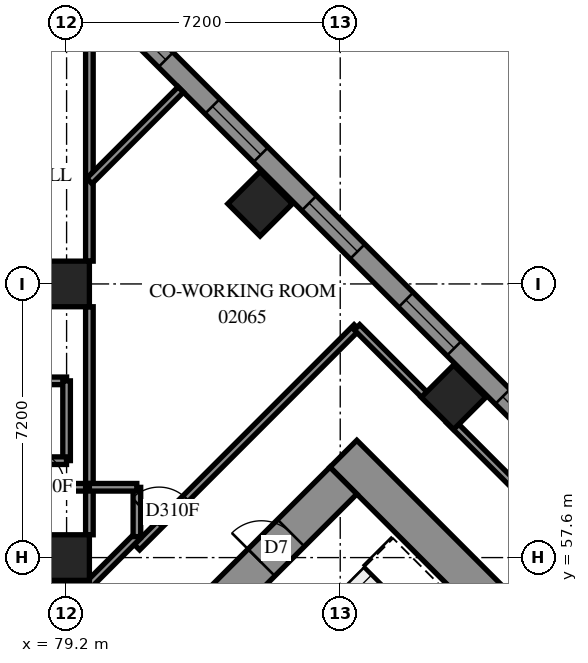
"""IFC4 building model, lengths in metres.
Left out: names, types, materials, properties, quantities, classifications, styles, units other than length and angle.
Written with IfcOpenShell. Run it as: python <this file> out.ifc"""

import sys

from ifc_helpers import new_model, si_unit, direction, frame, frame_2d, origin, origin_2d, place, context, subcontext, project, spatial, polyline, rectangle, outline, extrude, element, fill, save


model = new_model("IFC4")
c1 = context("Model", 3, precision=1e-05, world=origin(), true_north=direction((0.0, 1.0)))
c2 = subcontext(c1, "Body", "Model", "MODEL_VIEW")
j1 = project(units=[si_unit("LENGTHUNIT", "METRE"), si_unit("PLANEANGLEUNIT", "RADIAN")], contexts=[c1])
p1 = place(None, origin())
s1 = spatial("IfcSite", under=j1, at=p1, CompositionType="ELEMENT")
p2 = place(p1, origin())
s2 = spatial("IfcBuilding", under=s1, at=p2, CompositionType="ELEMENT")
p3 = place(p2, frame((0.0, 0.0, 10.2)))
s3 = spatial("IfcBuildingStorey", under=s2, at=p3, CompositionType="ELEMENT", Elevation=10.2)
for number, where, z_axis, x_axis in (
    (1, (79.2, 57.6, 0.0), (0.0, 0.0, 1.0), (1.0, 0.0, 0.0)),
    (2, (79.2, 64.8, 0.0), (0.0, 0.0, 1.0), (1.0, 0.0, 0.0)),
    (3, (84.291, 66.909, 0.0), (0.0, 0.0, 1.0), (0.707, -0.707, 0.0)),
    (4, (89.382, 61.818, 0.0), (0.0, 0.0, 1.0), (0.707, -0.707, 0.0)),
):
    element("IfcColumn", number, at=place(p3, frame(where, z_axis=z_axis, x_axis=x_axis)), inside=s3, PredefinedType="COLUMN", context=c2, shape_type="SweptSolid", body=[
        extrude(rectangle(XDim=1.2, YDim=1.2, at=origin_2d()), origin(), (0.0, 0.0, 1.0), 3.8),
    ])
p4 = place(p3, frame((86.483, 60.333, -0.4), z_axis=(0.0, 0.0, 1.0), x_axis=(0.70710983, -0.7071037324, 0.0)))
e5 = element("IfcWall", 5, at=p4, inside=s3, PredefinedType="SHEAR", context=c2, shape_type="SweptSolid", body=[
    extrude(rectangle(XDim=16.4, YDim=1.0, at=frame_2d((8.2, 0.0))), origin(), (0.0, 0.0, 1.0), 3.5),
])
p5 = place(p4, frame((11.0, 0.0, 0.4)))
e6 = element("IfcOpeningElement", 6, at=p5, cuts=e5, PredefinedType="OPENING", context=c2, shape_type="SweptSolid", body=[
    extrude(rectangle(XDim=0.8, YDim=2.1, at=frame_2d((0.4, 1.05))), frame((0.0, 0.51, 0.0), z_axis=(0.0, -1.0, 0.0), x_axis=(1.0, 0.0, 0.0)), (0.0, 0.0, 1.0), 1.02),
])
p6 = place(p3, frame((76.301, 49.443, -0.4), z_axis=(0.0, 0.0, 1.0), x_axis=(0.7071067812, 0.7071067812, 0.0)))
e7 = element("IfcWall", 7, at=p6, inside=s3, PredefinedType="SHEAR", context=c2, shape_type="SweptSolid", body=[
    extrude(rectangle(XDim=14.4, YDim=1.0, at=frame_2d((7.2, 0.0))), origin(), (0.0, 0.0, 1.0), 3.5),
])
p7 = place(p6, frame((4.55, 0.0, 0.4)))
e8 = element("IfcOpeningElement", 8, at=p7, cuts=e7, PredefinedType="OPENING", context=c2, shape_type="SweptSolid", body=[
    extrude(rectangle(XDim=1.1, YDim=2.1, at=frame_2d((0.55, 1.05))), frame((0.0, 0.51, 0.0), z_axis=(0.0, -1.0, 0.0), x_axis=(1.0, 0.0, 0.0)), (0.0, 0.0, 1.0), 1.02),
])
p8 = place(p6, frame((11.35, 0.0, 0.4)))
e9 = element("IfcOpeningElement", 9, at=p8, cuts=e7, PredefinedType="OPENING", context=c2, shape_type="SweptSolid", body=[
    extrude(rectangle(XDim=1.1, YDim=2.1, at=frame_2d((0.55, 1.05))), frame((0.0, 0.51, 0.0), z_axis=(0.0, -1.0, 0.0), x_axis=(1.0, 0.0, 0.0)), (0.0, 0.0, 1.0), 1.02),
])
p9 = place(p3, frame((117.843, 34.665, 0.0), z_axis=(0.0, 0.0, 1.0), x_axis=(-0.7071067812, 0.7071067812, 0.0)))
e10 = element("IfcWall", 10, at=p9, inside=s3, PredefinedType="SOLIDWALL", context=c2, shape_type="SweptSolid", body=[
    extrude(outline(polyline([(-0.275, -0.275), (54.222, -0.275), (53.994, 0.275), (0.275, 0.275), (-0.275, -0.275)])), origin(), (0.0, 0.0, 1.0), 3.8),
])
p10 = place(p9, frame((0.8, 0.0, 0.7)))
e11 = element("IfcOpeningElement", 11, at=p10, cuts=e10, PredefinedType="OPENING", context=c2, shape_type="SweptSolid", body=[
    extrude(rectangle(XDim=1.8, YDim=2.6, at=frame_2d((0.9, 1.3))), frame((0.0, 0.285, 0.0), z_axis=(0.0, -1.0, 0.0), x_axis=(1.0, 0.0, 0.0)), (0.0, 0.0, 1.0), 0.57),
])
p11 = place(p9, frame((4.225, 0.0, 0.7)))
e12 = element("IfcOpeningElement", 12, at=p11, cuts=e10, PredefinedType="OPENING", context=c2, shape_type="SweptSolid", body=[
    extrude(rectangle(XDim=1.8, YDim=2.6, at=frame_2d((0.9, 1.3))), frame((0.0, 0.285, 0.0), z_axis=(0.0, -1.0, 0.0), x_axis=(1.0, 0.0, 0.0)), (0.0, 0.0, 1.0), 0.57),
])
p12 = place(p9, frame((7.825, 0.0, 0.7)))
e13 = element("IfcOpeningElement", 13, at=p12, cuts=e10, PredefinedType="OPENING", context=c2, shape_type="SweptSolid", body=[
    extrude(rectangle(XDim=1.8, YDim=2.6, at=frame_2d((0.9, 1.3))), frame((0.0, 0.285, 0.0), z_axis=(0.0, -1.0, 0.0), x_axis=(1.0, 0.0, 0.0)), (0.0, 0.0, 1.0), 0.57),
])
p13 = place(p9, frame((11.425, 0.0, 0.7)))
e14 = element("IfcOpeningElement", 14, at=p13, cuts=e10, PredefinedType="OPENING", context=c2, shape_type="SweptSolid", body=[
    extrude(rectangle(XDim=1.8, YDim=2.6, at=frame_2d((0.9, 1.3))), frame((0.0, 0.285, 0.0), z_axis=(0.0, -1.0, 0.0), x_axis=(1.0, 0.0, 0.0)), (0.0, 0.0, 1.0), 0.57),
])
p14 = place(p9, frame((15.025, 0.0, 0.7)))
e15 = element("IfcOpeningElement", 15, at=p14, cuts=e10, PredefinedType="OPENING", context=c2, shape_type="SweptSolid", body=[
    extrude(rectangle(XDim=1.8, YDim=2.6, at=frame_2d((0.9, 1.3))), frame((0.0, 0.285, 0.0), z_axis=(0.0, -1.0, 0.0), x_axis=(1.0, 0.0, 0.0)), (0.0, 0.0, 1.0), 0.57),
])
p15 = place(p9, frame((18.625, 0.0, 0.7)))
e16 = element("IfcOpeningElement", 16, at=p15, cuts=e10, PredefinedType="OPENING", context=c2, shape_type="SweptSolid", body=[
    extrude(rectangle(XDim=1.8, YDim=2.6, at=frame_2d((0.9, 1.3))), frame((0.0, 0.285, 0.0), z_axis=(0.0, -1.0, 0.0), x_axis=(1.0, 0.0, 0.0)), (0.0, 0.0, 1.0), 0.57),
])
p16 = place(p9, frame((22.225, 0.0, 0.7)))
e17 = element("IfcOpeningElement", 17, at=p16, cuts=e10, PredefinedType="OPENING", context=c2, shape_type="SweptSolid", body=[
    extrude(rectangle(XDim=1.8, YDim=2.6, at=frame_2d((0.9, 1.3))), frame((0.0, 0.285, 0.0), z_axis=(0.0, -1.0, 0.0), x_axis=(1.0, 0.0, 0.0)), (0.0, 0.0, 1.0), 0.57),
])
p17 = place(p9, frame((25.825, 0.0, 0.7)))
e18 = element("IfcOpeningElement", 18, at=p17, cuts=e10, PredefinedType="OPENING", context=c2, shape_type="SweptSolid", body=[
    extrude(rectangle(XDim=1.8, YDim=2.6, at=frame_2d((0.9, 1.3))), frame((0.0, 0.285, 0.0), z_axis=(0.0, -1.0, 0.0), x_axis=(1.0, 0.0, 0.0)), (0.0, 0.0, 1.0), 0.57),
])
p18 = place(p9, frame((29.425, 0.0, 0.7)))
e19 = element("IfcOpeningElement", 19, at=p18, cuts=e10, PredefinedType="OPENING", context=c2, shape_type="SweptSolid", body=[
    extrude(rectangle(XDim=1.8, YDim=2.6, at=frame_2d((0.9, 1.3))), frame((0.0, 0.285, 0.0), z_axis=(0.0, -1.0, 0.0), x_axis=(1.0, 0.0, 0.0)), (0.0, 0.0, 1.0), 0.57),
])
p19 = place(p9, frame((33.025, 0.0, 0.7)))
e20 = element("IfcOpeningElement", 20, at=p19, cuts=e10, PredefinedType="OPENING", context=c2, shape_type="SweptSolid", body=[
    extrude(rectangle(XDim=1.8, YDim=2.6, at=frame_2d((0.9, 1.3))), frame((0.0, 0.285, 0.0), z_axis=(0.0, -1.0, 0.0), x_axis=(1.0, 0.0, 0.0)), (0.0, 0.0, 1.0), 0.57),
])
p20 = place(p9, frame((36.625, 0.0, 0.7)))
e21 = element("IfcOpeningElement", 21, at=p20, cuts=e10, PredefinedType="OPENING", context=c2, shape_type="SweptSolid", body=[
    extrude(rectangle(XDim=1.8, YDim=2.6, at=frame_2d((0.9, 1.3))), frame((0.0, 0.285, 0.0), z_axis=(0.0, -1.0, 0.0), x_axis=(1.0, 0.0, 0.0)), (0.0, 0.0, 1.0), 0.57),
])
p21 = place(p9, frame((40.225, 0.0, 0.7)))
e22 = element("IfcOpeningElement", 22, at=p21, cuts=e10, PredefinedType="OPENING", context=c2, shape_type="SweptSolid", body=[
    extrude(rectangle(XDim=1.8, YDim=2.6, at=frame_2d((0.9, 1.3))), frame((0.0, 0.285, 0.0), z_axis=(0.0, -1.0, 0.0), x_axis=(1.0, 0.0, 0.0)), (0.0, 0.0, 1.0), 0.57),
])
p22 = place(p9, frame((43.825, 0.0, 0.7)))
e23 = element("IfcOpeningElement", 23, at=p22, cuts=e10, PredefinedType="OPENING", context=c2, shape_type="SweptSolid", body=[
    extrude(rectangle(XDim=1.8, YDim=2.6, at=frame_2d((0.9, 1.3))), frame((0.0, 0.285, 0.0), z_axis=(0.0, -1.0, 0.0), x_axis=(1.0, 0.0, 0.0)), (0.0, 0.0, 1.0), 0.57),
])
p23 = place(p9, frame((47.425, 0.0, 0.7)))
e24 = element("IfcOpeningElement", 24, at=p23, cuts=e10, PredefinedType="OPENING", context=c2, shape_type="SweptSolid", body=[
    extrude(rectangle(XDim=1.8, YDim=2.6, at=frame_2d((0.9, 1.3))), frame((0.0, 0.285, 0.0), z_axis=(0.0, -1.0, 0.0), x_axis=(1.0, 0.0, 0.0)), (0.0, 0.0, 1.0), 0.57),
])
p24 = place(p9, frame((50.96, 0.0, 0.7)))
e25 = element("IfcOpeningElement", 25, at=p24, cuts=e10, PredefinedType="OPENING", context=c2, shape_type="SweptSolid", body=[
    extrude(rectangle(XDim=1.8, YDim=2.6, at=frame_2d((0.9, 1.3))), frame((0.0, 0.285, 0.0), z_axis=(0.0, -1.0, 0.0), x_axis=(1.0, 0.0, 0.0)), (0.0, 0.0, 1.0), 0.57),
])
p25 = place(p3, frame((81.052, 57.873, 0.0), z_axis=(0.0, 0.0, 1.0), x_axis=(0.7071067812, 0.7071067812, 0.0)))
e26 = element("IfcWall", 26, at=p25, inside=s3, PredefinedType="PARTITIONING", context=c2, shape_type="SweptSolid", body=[
    extrude(rectangle(XDim=8.18, YDim=0.2, at=frame_2d((4.09, 0.0))), origin(), (0.0, 0.0, 1.0), 3.8),
])
p26 = place(p25, frame((0.823, 0.0, 0.0)))
e27 = element("IfcOpeningElement", 27, at=p26, cuts=e26, PredefinedType="OPENING", context=c2, shape_type="SweptSolid", body=[
    extrude(rectangle(XDim=1.0, YDim=2.1, at=frame_2d((0.5, 1.05))), frame((0.0, 0.11, 0.0), z_axis=(0.0, -1.0, 0.0), x_axis=(1.0, 0.0, 0.0)), (0.0, 0.0, 1.0), 0.22),
])
p27 = place(p3, frame((89.271, 61.215, 0.0), z_axis=(0.0, 0.0, 1.0), x_axis=(0.7071067812, -0.7071067812, 0.0)))
e28 = element("IfcWall", 28, at=p27, inside=s3, PredefinedType="PARTITIONING", context=c2, shape_type="SweptSolid", body=[
    extrude(rectangle(XDim=6.505, YDim=0.2, at=frame_2d((3.253, 0.0))), origin(), (0.0, 0.0, 1.0), 3.8),
])
p28 = place(p3, frame((79.8, 65.4, 0.0), z_axis=(0.0, 0.0, 1.0), x_axis=(0.0, 1.0, 0.0)))
e29 = element("IfcWall", 29, at=p28, inside=s3, PredefinedType="PARTITIONING", context=c2, shape_type="SweptSolid", body=[
    extrude(rectangle(XDim=6.0, YDim=0.2, at=frame_2d((3.0, 0.0))), origin(), (0.0, 0.0, 1.0), 3.8),
])
p29 = place(p3, frame((79.8, 59.45, 0.0), z_axis=(0.0, 0.0, 1.0), x_axis=(0.0, 1.0, 0.0)))
e30 = element("IfcWall", 30, at=p29, inside=s3, PredefinedType="PARTITIONING", context=c2, shape_type="SweptSolid", body=[
    extrude(rectangle(XDim=4.75, YDim=0.2, at=frame_2d((2.375, 0.0))), origin(), (0.0, 0.0, 1.0), 3.8),
])
p30 = place(p3, frame((75.102, 62.25, 0.0), z_axis=(0.0, 0.0, 1.0), x_axis=(1.0, 0.0, 0.0)))
e31 = element("IfcWall", 31, at=p30, inside=s3, PredefinedType="PARTITIONING", context=c2, shape_type="SweptSolid", body=[
    extrude(rectangle(XDim=4.098, YDim=0.2, at=frame_2d((2.049, 0.0))), origin(), (0.0, 0.0, 1.0), 3.8),
])
p31 = place(p3, frame((79.799, 67.509, 0.0), z_axis=(0.0, 0.0, 1.0), x_axis=(0.7070920842, 0.7071214778, 0.0)))
e32 = element("IfcWall", 32, at=p31, inside=s3, PredefinedType="PARTITIONING", context=c2, shape_type="SweptSolid", body=[
    extrude(rectangle(XDim=3.402, YDim=0.2, at=frame_2d((1.701, 0.0))), origin(), (0.0, 0.0, 1.0), 3.8),
])
p32 = place(p3, frame((86.841, 63.659, 0.0), z_axis=(0.0, 0.0, 1.0), x_axis=(0.7067795096, -0.7074339014, 0.0)))
e33 = element("IfcWall", 33, at=p32, inside=s3, PredefinedType="PARTITIONING", context=c2, shape_type="SweptSolid", body=[
    extrude(rectangle(XDim=2.751, YDim=0.2, at=frame_2d((1.375, 0.0))), origin(), (0.0, 0.0, 1.0), 3.8),
])
p33 = place(p3, frame((79.2, 60.152, 0.0), z_axis=(0.0, 0.0, 1.0), x_axis=(0.0, 1.0, 0.0)))
e34 = element("IfcWall", 34, at=p33, inside=s3, PredefinedType="PARTITIONING", context=c2, shape_type="SweptSolid", body=[
    extrude(rectangle(XDim=2.098, YDim=0.2, at=frame_2d((1.049, 0.0))), origin(), (0.0, 0.0, 1.0), 3.8),
])
p34 = place(p3, frame((77.264, 60.15, 0.0), z_axis=(0.0, 0.0, 1.0), x_axis=(1.0, 0.0, 0.0)))
e35 = element("IfcWall", 35, at=p34, inside=s3, PredefinedType="PARTITIONING", context=c2, shape_type="SweptSolid", body=[
    extrude(rectangle(XDim=1.934, YDim=0.2, at=frame_2d((0.967, 0.0))), origin(), (0.0, 0.0, 1.0), 3.8),
])
p35 = place(p3, frame((77.962, 59.45, 0.0), z_axis=(0.0, 0.0, 1.0), x_axis=(1.0, 0.0, 0.0)))
e36 = element("IfcWall", 36, at=p35, inside=s3, PredefinedType="PARTITIONING", context=c2, shape_type="SweptSolid", body=[
    extrude(rectangle(XDim=1.838, YDim=0.2, at=frame_2d((0.919, 0.0))), origin(), (0.0, 0.0, 1.0), 3.8),
])
p36 = place(p35, frame((0.195, 0.0, 0.0)))
e37 = element("IfcOpeningElement", 37, at=p36, cuts=e36, PredefinedType="OPENING", context=c2, shape_type="SweptSolid", body=[
    extrude(rectangle(XDim=1.0, YDim=2.1, at=frame_2d((0.5, 1.05))), frame((0.0, 0.11, 0.0), z_axis=(0.0, -1.0, 0.0), x_axis=(1.0, 0.0, 0.0)), (0.0, 0.0, 1.0), 0.22),
])
p37 = place(p3, frame((79.801, 56.905, 0.0), z_axis=(0.0, 0.0, 1.0), x_axis=(0.7071067812, 0.7071067812, 0.0)))
e38 = element("IfcWall", 38, at=p37, inside=s3, PredefinedType="PARTITIONING", context=c2, shape_type="SweptSolid", body=[
    extrude(rectangle(XDim=1.765, YDim=0.2, at=frame_2d((0.882, 0.0))), origin(), (0.0, 0.0, 1.0), 3.8),
])
p38 = place(p3, frame((81.05, 58.152, 0.0), z_axis=(0.0, 0.0, 1.0), x_axis=(0.0, 1.0, 0.0)))
e39 = element("IfcWall", 39, at=p38, inside=s3, PredefinedType="PARTITIONING", context=c2, shape_type="SweptSolid", body=[
    extrude(rectangle(XDim=1.296, YDim=0.2, at=frame_2d((0.648, 0.0))), origin(), (0.0, 0.0, 1.0), 3.8),
])
p39 = place(p3, frame((79.8, 58.2, 0.0), z_axis=(0.0, 0.0, 1.0), x_axis=(0.0, 1.0, 0.0)))
e40 = element("IfcWall", 40, at=p39, inside=s3, PredefinedType="PARTITIONING", context=c2, shape_type="SweptSolid", body=[
    extrude(rectangle(XDim=1.25, YDim=0.2, at=frame_2d((0.625, 0.0))), origin(), (0.0, 0.0, 1.0), 3.8),
])
p40 = place(p3, frame((79.8, 59.45, 0.0), z_axis=(0.0, 0.0, 1.0), x_axis=(1.0, 0.0, 0.0)))
e41 = element("IfcWall", 41, at=p40, inside=s3, PredefinedType="PARTITIONING", context=c2, shape_type="SweptSolid", body=[
    extrude(rectangle(XDim=1.248, YDim=0.2, at=frame_2d((0.624, 0.0))), origin(), (0.0, 0.0, 1.0), 3.8),
])
p41 = place(p20, origin())
e42 = element("IfcWindow", 42, at=p41, inside=s3, PartitioningType="SINGLE_PANEL", PredefinedType="WINDOW", context=c2, shape_type="SweptSolid", body=[
    extrude(rectangle(XDim=1.8, YDim=2.6, at=frame_2d((0.9, 1.3))), frame((0.0, 0.155, 0.0), z_axis=(0.0, -1.0, 0.0), x_axis=(1.0, 0.0, 0.0)), (0.0, 0.0, 1.0), 0.06),
])
fill(e21, e42)
p42 = place(p21, origin())
e43 = element("IfcWindow", 43, at=p42, inside=s3, PartitioningType="SINGLE_PANEL", PredefinedType="WINDOW", context=c2, shape_type="SweptSolid", body=[
    extrude(rectangle(XDim=1.8, YDim=2.6, at=frame_2d((0.9, 1.3))), frame((0.0, 0.155, 0.0), z_axis=(0.0, -1.0, 0.0), x_axis=(1.0, 0.0, 0.0)), (0.0, 0.0, 1.0), 0.06),
])
fill(e22, e43)
p43 = place(p22, origin())
e44 = element("IfcWindow", 44, at=p43, inside=s3, PartitioningType="SINGLE_PANEL", PredefinedType="WINDOW", context=c2, shape_type="SweptSolid", body=[
    extrude(rectangle(XDim=1.8, YDim=2.6, at=frame_2d((0.9, 1.3))), frame((0.0, 0.155, 0.0), z_axis=(0.0, -1.0, 0.0), x_axis=(1.0, 0.0, 0.0)), (0.0, 0.0, 1.0), 0.06),
])
fill(e23, e44)
p44 = place(p23, origin())
e45 = element("IfcWindow", 45, at=p44, inside=s3, PartitioningType="SINGLE_PANEL", PredefinedType="WINDOW", context=c2, shape_type="SweptSolid", body=[
    extrude(rectangle(XDim=1.8, YDim=2.6, at=frame_2d((0.9, 1.3))), frame((0.0, 0.155, 0.0), z_axis=(0.0, -1.0, 0.0), x_axis=(1.0, 0.0, 0.0)), (0.0, 0.0, 1.0), 0.06),
])
fill(e24, e45)
p45 = place(p24, origin())
e46 = element("IfcWindow", 46, at=p45, inside=s3, PartitioningType="SINGLE_PANEL", PredefinedType="WINDOW", context=c2, shape_type="SweptSolid", body=[
    extrude(rectangle(XDim=1.8, YDim=2.6, at=frame_2d((0.9, 1.3))), frame((0.0, 0.155, 0.0), z_axis=(0.0, -1.0, 0.0), x_axis=(1.0, 0.0, 0.0)), (0.0, 0.0, 1.0), 0.06),
])
fill(e25, e46)
p46 = place(p8, origin())
e47 = element("IfcDoor", 47, at=p46, inside=s3, OperationType="SINGLE_SWING_LEFT", PredefinedType="DOOR", context=c2, shape_type="SweptSolid", body=[
    extrude(rectangle(XDim=1.1, YDim=2.1, at=frame_2d((0.55, 1.05))), frame((0.0, 0.025, 0.0), z_axis=(0.0, -1.0, 0.0), x_axis=(1.0, 0.0, 0.0)), (0.0, 0.0, 1.0), 0.05),
])
fill(e9, e47)
p47 = place(p36, origin())
e48 = element("IfcDoor", 48, at=p47, inside=s3, OperationType="SINGLE_SWING_LEFT", PredefinedType="DOOR", context=c2, shape_type="SweptSolid", body=[
    extrude(rectangle(XDim=1.0, YDim=2.1, at=frame_2d((0.5, 1.05))), frame((0.0, 0.025, 0.0), z_axis=(0.0, -1.0, 0.0), x_axis=(1.0, 0.0, 0.0)), (0.0, 0.0, 1.0), 0.05),
])
fill(e37, e48)
p48 = place(p26, origin())
e49 = element("IfcDoor", 49, at=p48, inside=s3, OperationType="SINGLE_SWING_RIGHT", PredefinedType="DOOR", context=c2, shape_type="SweptSolid", body=[
    extrude(rectangle(XDim=1.0, YDim=2.1, at=frame_2d((0.5, 1.05))), frame((0.0, 0.025, 0.0), z_axis=(0.0, -1.0, 0.0), x_axis=(1.0, 0.0, 0.0)), (0.0, 0.0, 1.0), 0.05),
])
fill(e27, e49)
save(model, sys.argv[1])
